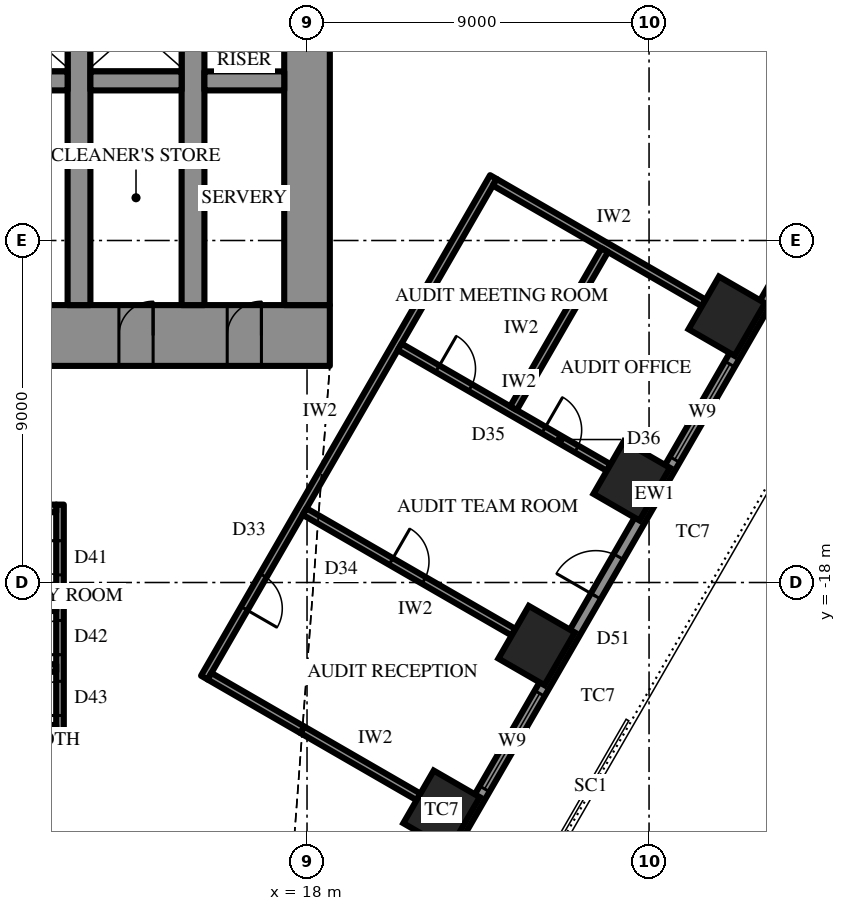
"""IFC4 building model, lengths in metres.
Left out: names, types, materials, properties, quantities, classifications, styles, units other than length and angle.
Written with IfcOpenShell. Run it as: python <this file> out.ifc"""

import sys

from ifc_helpers import new_model, si_unit, direction, frame, frame_2d, origin, origin_2d, place, context, subcontext, project, spatial, rectangle, extrude, element, fill, save


model = new_model("IFC4")
c1 = context("Model", 3, precision=1e-05, world=origin(), true_north=direction((0.0, 1.0)))
c2 = subcontext(c1, "Body", "Model", "MODEL_VIEW")
j1 = project(units=[si_unit("LENGTHUNIT", "METRE"), si_unit("PLANEANGLEUNIT", "RADIAN")], contexts=[c1])
p1 = place(None, origin())
s1 = spatial("IfcSite", under=j1, at=p1, CompositionType="ELEMENT")
p2 = place(p1, origin())
s2 = spatial("IfcBuilding", under=s1, at=p2, CompositionType="ELEMENT")
p3 = place(p2, frame((0.0, 0.0, 161.5)))
s3 = spatial("IfcBuildingStorey", under=s2, at=p3, CompositionType="ELEMENT", Elevation=161.5)
for number, where, z_axis, x_axis in (
    (1, (21.54, -23.992, 0.0), (0.0, 0.0, 1.0), (0.5, 0.866, 0.0)),
    (2, (24.042, -19.658, 0.0), (0.0, 0.0, 1.0), (0.5, 0.866, 0.0)),
    (3, (26.544, -15.325, 0.0), (0.0, 0.0, 1.0), (0.5, 0.866, 0.0)),
    (4, (29.045, -10.992, 0.0), (0.0, 0.0, 1.0), (0.5, 0.866, 0.0)),
):
    element("IfcColumn", number, at=place(p3, frame(where, z_axis=z_axis, x_axis=x_axis)), inside=s3, PredefinedType="COLUMN", context=c2, shape_type="SweptSolid", body=[
        extrude(rectangle(XDim=1.6, YDim=1.4, at=origin_2d()), origin(), (0.0, 0.0, 1.0), 4.2),
    ])
p4 = place(p3, frame((18.6, -11.5, 0.0), z_axis=(0.0, 0.0, 1.0), x_axis=(-1.0, 0.0, 0.0)))
e5 = element("IfcWall", 5, at=p4, inside=s3, PredefinedType="SHEAR", context=c2, shape_type="SweptSolid", body=[
    extrude(rectangle(XDim=37.2, YDim=1.6, at=frame_2d((18.6, 0.0))), origin(), (0.0, 0.0, 1.0), 4.2),
])
p5 = place(p4, frame((19.45, 0.0, 0.0)))
e6 = element("IfcOpeningElement", 6, at=p5, cuts=e5, PredefinedType="OPENING", context=c2, shape_type="SweptSolid", body=[
    extrude(rectangle(XDim=0.9, YDim=2.2, at=frame_2d((0.45, 1.1))), frame((0.0, 0.81, 0.0), z_axis=(0.0, -1.0, 0.0), x_axis=(1.0, 0.0, 0.0)), (0.0, 0.0, 1.0), 1.62),
])
p6 = place(p4, frame((22.45, 0.0, 0.0)))
e7 = element("IfcOpeningElement", 7, at=p6, cuts=e5, PredefinedType="OPENING", context=c2, shape_type="SweptSolid", body=[
    extrude(rectangle(XDim=0.9, YDim=2.2, at=frame_2d((0.45, 1.1))), frame((0.0, 0.81, 0.0), z_axis=(0.0, -1.0, 0.0), x_axis=(1.0, 0.0, 0.0)), (0.0, 0.0, 1.0), 1.62),
])
p7 = place(p4, frame((25.5, 0.0, 0.0)))
e8 = element("IfcOpeningElement", 8, at=p7, cuts=e5, PredefinedType="OPENING", context=c2, shape_type="SweptSolid", body=[
    extrude(rectangle(XDim=1.0, YDim=2.2, at=frame_2d((0.5, 1.1))), frame((0.0, 0.81, 0.0), z_axis=(0.0, -1.0, 0.0), x_axis=(1.0, 0.0, 0.0)), (0.0, 0.0, 1.0), 1.62),
])
p8 = place(p4, frame((1.8, 0.0, 0.0)))
e9 = element("IfcOpeningElement", 9, at=p8, cuts=e5, PredefinedType="OPENING", context=c2, shape_type="SweptSolid", body=[
    extrude(rectangle(XDim=0.9, YDim=2.2, at=frame_2d((0.45, 1.1))), frame((0.0, 0.81, 0.0), z_axis=(0.0, -1.0, 0.0), x_axis=(1.0, 0.0, 0.0)), (0.0, 0.0, 1.0), 1.62),
])
p9 = place(p4, frame((4.65, 0.0, 0.0)))
e10 = element("IfcOpeningElement", 10, at=p9, cuts=e5, PredefinedType="OPENING", context=c2, shape_type="SweptSolid", body=[
    extrude(rectangle(XDim=0.9, YDim=2.2, at=frame_2d((0.45, 1.1))), frame((0.0, 0.81, 0.0), z_axis=(0.0, -1.0, 0.0), x_axis=(1.0, 0.0, 0.0)), (0.0, 0.0, 1.0), 1.62),
])
p10 = place(p4, frame((7.75, 0.0, 0.0)))
e11 = element("IfcOpeningElement", 11, at=p10, cuts=e5, PredefinedType="OPENING", context=c2, shape_type="SweptSolid", body=[
    extrude(rectangle(XDim=0.9, YDim=2.2, at=frame_2d((0.45, 1.1))), frame((0.0, 0.81, 0.0), z_axis=(0.0, -1.0, 0.0), x_axis=(1.0, 0.0, 0.0)), (0.0, 0.0, 1.0), 1.62),
])
p11 = place(p4, frame((28.55, 0.0, 0.0)))
e12 = element("IfcOpeningElement", 12, at=p11, cuts=e5, PredefinedType="OPENING", context=c2, shape_type="SweptSolid", body=[
    extrude(rectangle(XDim=0.9, YDim=2.2, at=frame_2d((0.45, 1.1))), frame((0.0, 0.81, 0.0), z_axis=(0.0, -1.0, 0.0), x_axis=(1.0, 0.0, 0.0)), (0.0, 0.0, 1.0), 1.62),
])
p12 = place(p4, frame((31.65, 0.0, 0.0)))
e13 = element("IfcOpeningElement", 13, at=p12, cuts=e5, PredefinedType="OPENING", context=c2, shape_type="SweptSolid", body=[
    extrude(rectangle(XDim=0.9, YDim=2.2, at=frame_2d((0.45, 1.1))), frame((0.0, 0.81, 0.0), z_axis=(0.0, -1.0, 0.0), x_axis=(1.0, 0.0, 0.0)), (0.0, 0.0, 1.0), 1.62),
])
p13 = place(p4, frame((34.5, 0.0, 0.0)))
e14 = element("IfcOpeningElement", 14, at=p13, cuts=e5, PredefinedType="OPENING", context=c2, shape_type="SweptSolid", body=[
    extrude(rectangle(XDim=0.9, YDim=2.2, at=frame_2d((0.45, 1.1))), frame((0.0, 0.81, 0.0), z_axis=(0.0, -1.0, 0.0), x_axis=(1.0, 0.0, 0.0)), (0.0, 0.0, 1.0), 1.62),
])
p14 = place(p3, frame((18.0, -10.7, 0.0), z_axis=(0.0, 0.0, 1.0), x_axis=(0.0, 1.0, 0.0)))
e15 = element("IfcWall", 15, at=p14, inside=s3, PredefinedType="SHEAR", context=c2, shape_type="SweptSolid", body=[
    extrude(rectangle(XDim=21.4, YDim=1.2, at=frame_2d((10.7, 0.0))), origin(), (0.0, 0.0, 1.0), 4.2),
])
p15 = place(p14, frame((9.8, 0.0, 0.0)))
e16 = element("IfcOpeningElement", 16, at=p15, cuts=e15, PredefinedType="OPENING", context=c2, shape_type="SweptSolid", body=[
    extrude(rectangle(XDim=1.8, YDim=2.4, at=frame_2d((0.9, 1.2))), frame((0.0, 0.61, 0.0), z_axis=(0.0, -1.0, 0.0), x_axis=(1.0, 0.0, 0.0)), (0.0, 0.0, 1.0), 1.22),
])
p16 = place(p3, frame((12.0, -10.7, 0.0), z_axis=(0.0, 0.0, 1.0), x_axis=(0.0, 1.0, 0.0)))
e17 = element("IfcWall", 17, at=p16, inside=s3, PredefinedType="SHEAR", context=c2, shape_type="SweptSolid", body=[
    extrude(rectangle(XDim=21.4, YDim=0.6, at=frame_2d((10.7, 0.0))), origin(), (0.0, 0.0, 1.0), 4.2),
])
p17 = place(p16, frame((9.8, 0.0, 0.0)))
e18 = element("IfcOpeningElement", 18, at=p17, cuts=e17, PredefinedType="OPENING", context=c2, shape_type="SweptSolid", body=[
    extrude(rectangle(XDim=1.8, YDim=2.4, at=frame_2d((0.9, 1.2))), frame((0.0, 0.31, 0.0), z_axis=(0.0, -1.0, 0.0), x_axis=(1.0, 0.0, 0.0)), (0.0, 0.0, 1.0), 0.62),
])
p18 = place(p3, frame((15.0, -10.7, 0.0), z_axis=(0.0, 0.0, 1.0), x_axis=(0.0, 1.0, 0.0)))
e19 = element("IfcWall", 19, at=p18, inside=s3, PredefinedType="SHEAR", context=c2, shape_type="SweptSolid", body=[
    extrude(rectangle(XDim=21.4, YDim=0.6, at=frame_2d((10.7, 0.0))), origin(), (0.0, 0.0, 1.0), 4.2),
])
p19 = place(p18, frame((9.8, 0.0, 0.0)))
e20 = element("IfcOpeningElement", 20, at=p19, cuts=e19, PredefinedType="OPENING", context=c2, shape_type="SweptSolid", body=[
    extrude(rectangle(XDim=1.8, YDim=2.4, at=frame_2d((0.9, 1.2))), frame((0.0, 0.31, 0.0), z_axis=(0.0, -1.0, 0.0), x_axis=(1.0, 0.0, 0.0)), (0.0, 0.0, 1.0), 0.62),
])
p20 = place(p3, frame((17.4, -4.8, 0.0), z_axis=(0.0, 0.0, 1.0), x_axis=(-1.0, 0.0, 0.0)))
e21 = element("IfcWall", 21, at=p20, inside=s3, PredefinedType="SHEAR", context=c2, shape_type="SweptSolid", body=[
    extrude(rectangle(XDim=2.1, YDim=0.5, at=frame_2d((1.05, 0.0))), origin(), (0.0, 0.0, 1.0), 4.2),
])
p21 = place(p3, frame((14.7, -4.8, 0.0), z_axis=(0.0, 0.0, 1.0), x_axis=(-1.0, 0.0, 0.0)))
e22 = element("IfcWall", 22, at=p21, inside=s3, PredefinedType="SHEAR", context=c2, shape_type="SweptSolid", body=[
    extrude(rectangle(XDim=2.4, YDim=0.5, at=frame_2d((1.2, 0.0))), origin(), (0.0, 0.0, 1.0), 4.2),
])
p22 = place(p3, frame((11.7, -4.8, 0.0), z_axis=(0.0, 0.0, 1.0), x_axis=(-1.0, 0.0, 0.0)))
e23 = element("IfcWall", 23, at=p22, inside=s3, PredefinedType="SHEAR", context=c2, shape_type="SweptSolid", body=[
    extrude(rectangle(XDim=23.4, YDim=0.5, at=frame_2d((11.7, 0.0))), origin(), (0.0, 0.0, 1.0), 4.2),
])
p23 = place(p22, frame((6.6, 0.0, 0.0)))
e24 = element("IfcOpeningElement", 24, at=p23, cuts=e23, PredefinedType="OPENING", context=c2, shape_type="SweptSolid", body=[
    extrude(rectangle(XDim=1.2, YDim=2.2, at=frame_2d((0.6, 1.1))), frame((0.0, 0.26, 0.0), z_axis=(0.0, -1.0, 0.0), x_axis=(1.0, 0.0, 0.0)), (0.0, 0.0, 1.0), 0.52),
])
p24 = place(p22, frame((3.6, 0.0, 0.0)))
e25 = element("IfcOpeningElement", 25, at=p24, cuts=e23, PredefinedType="OPENING", context=c2, shape_type="SweptSolid", body=[
    extrude(rectangle(XDim=1.2, YDim=2.2, at=frame_2d((0.6, 1.1))), frame((0.0, 0.26, 0.0), z_axis=(0.0, -1.0, 0.0), x_axis=(1.0, 0.0, 0.0)), (0.0, 0.0, 1.0), 0.52),
])
p25 = place(p3, frame((19.644, -28.675, 0.0), z_axis=(0.0, 0.0, 1.0), x_axis=(0.500003084452, 0.866023622968, 0.0)))
e26 = element("IfcWall", 26, at=p25, inside=s3, PredefinedType="SOLIDWALL", context=c2, shape_type="SweptSolid", body=[
    extrude(rectangle(XDim=30.022, YDim=0.3, at=frame_2d((15.011, 0.0))), origin(), (0.0, 0.0, 1.0), 2.75),
])
p26 = place(p25, frame((1.052, 0.0, 0.6)))
e27 = element("IfcOpeningElement", 27, at=p26, cuts=e26, PredefinedType="OPENING", context=c2, shape_type="SweptSolid", body=[
    extrude(rectangle(XDim=2.9, YDim=1.9, at=frame_2d((1.45, 0.95))), frame((0.0, 0.16, 0.0), z_axis=(0.0, -1.0, 0.0), x_axis=(1.0, 0.0, 0.0)), (0.0, 0.0, 1.0), 0.32),
])
p27 = place(p25, frame((6.056, 0.0, 0.6)))
e28 = element("IfcOpeningElement", 28, at=p27, cuts=e26, PredefinedType="OPENING", context=c2, shape_type="SweptSolid", body=[
    extrude(rectangle(XDim=2.9, YDim=1.9, at=frame_2d((1.45, 0.95))), frame((0.0, 0.16, 0.0), z_axis=(0.0, -1.0, 0.0), x_axis=(1.0, 0.0, 0.0)), (0.0, 0.0, 1.0), 0.32),
])
p28 = place(p25, frame((11.909, 0.0, 0.0)))
e29 = element("IfcOpeningElement", 29, at=p28, cuts=e26, PredefinedType="OPENING", context=c2, shape_type="SweptSolid", body=[
    extrude(rectangle(XDim=1.2, YDim=2.4, at=frame_2d((0.6, 1.2))), frame((0.0, 0.16, 0.0), z_axis=(0.0, -1.0, 0.0), x_axis=(1.0, 0.0, 0.0)), (0.0, 0.0, 1.0), 0.32),
])
p29 = place(p25, frame((16.063, 0.0, 0.6)))
e30 = element("IfcOpeningElement", 30, at=p29, cuts=e26, PredefinedType="OPENING", context=c2, shape_type="SweptSolid", body=[
    extrude(rectangle(XDim=2.9, YDim=1.9, at=frame_2d((1.45, 0.95))), frame((0.0, 0.16, 0.0), z_axis=(0.0, -1.0, 0.0), x_axis=(1.0, 0.0, 0.0)), (0.0, 0.0, 1.0), 0.32),
])
p30 = place(p25, frame((21.067, 0.0, 0.6)))
e31 = element("IfcOpeningElement", 31, at=p30, cuts=e26, PredefinedType="OPENING", context=c2, shape_type="SweptSolid", body=[
    extrude(rectangle(XDim=2.9, YDim=1.9, at=frame_2d((1.45, 0.95))), frame((0.0, 0.16, 0.0), z_axis=(0.0, -1.0, 0.0), x_axis=(1.0, 0.0, 0.0)), (0.0, 0.0, 1.0), 0.32),
])
p31 = place(p25, frame((26.07, 0.0, 0.6)))
e32 = element("IfcOpeningElement", 32, at=p31, cuts=e26, PredefinedType="OPENING", context=c2, shape_type="SweptSolid", body=[
    extrude(rectangle(XDim=2.9, YDim=1.9, at=frame_2d((1.45, 0.95))), frame((0.0, 0.16, 0.0), z_axis=(0.0, -1.0, 0.0), x_axis=(1.0, 0.0, 0.0)), (0.0, 0.0, 1.0), 0.32),
])
p32 = place(p3, frame((15.298, -20.503, 0.0), z_axis=(0.0, 0.0, 1.0), x_axis=(0.500010972563, 0.86601906868, 0.0)))
e33 = element("IfcWall", 33, at=p32, inside=s3, PredefinedType="PARTITIONING", context=c2, shape_type="SweptSolid", body=[
    extrude(rectangle(XDim=15.211, YDim=0.2, at=frame_2d((7.605, 0.0))), origin(), (0.0, 0.0, 1.0), 4.0),
])
p33 = place(p32, frame((2.102, 0.0, 0.0)))
e34 = element("IfcOpeningElement", 34, at=p33, cuts=e33, PredefinedType="OPENING", context=c2, shape_type="SweptSolid", body=[
    extrude(rectangle(XDim=1.0, YDim=2.2, at=frame_2d((0.5, 1.1))), frame((0.0, 0.11, 0.0), z_axis=(0.0, -1.0, 0.0), x_axis=(1.0, 0.0, 0.0)), (0.0, 0.0, 1.0), 0.22),
])
p34 = place(p3, frame((15.435, -20.467, 0.0), z_axis=(0.0, 0.0, 1.0), x_axis=(0.866008320966, -0.500029587143, 0.0)))
e35 = element("IfcWall", 35, at=p34, inside=s3, PredefinedType="PARTITIONING", context=c2, shape_type="SweptSolid", body=[
    extrude(rectangle(XDim=2.821, YDim=0.2, at=frame_2d((1.411, 0.0))), origin(), (0.0, 0.0, 1.0), 4.0),
])
p35 = place(p3, frame((17.878, -21.877, 0.0), z_axis=(0.0, 0.0, 1.0), x_axis=(0.866033512162, -0.499985955615, 0.0)))
e36 = element("IfcWall", 36, at=p35, inside=s3, PredefinedType="PARTITIONING", context=c2, shape_type="SweptSolid", body=[
    extrude(rectangle(XDim=3.529, YDim=0.2, at=frame_2d((1.764, 0.0))), origin(), (0.0, 0.0, 1.0), 3.082),
])
p36 = place(p3, frame((17.936, -16.133, 0.0), z_axis=(0.0, 0.0, 1.0), x_axis=(0.866022320763, -0.500005339912, 0.0)))
e37 = element("IfcWall", 37, at=p36, inside=s3, PredefinedType="PARTITIONING", context=c2, shape_type="SweptSolid", body=[
    extrude(rectangle(XDim=6.35, YDim=0.2, at=frame_2d((3.175, 0.0))), origin(), (0.0, 0.0, 1.0), 3.082),
])
p37 = place(p36, frame((2.625, 0.0, 0.0)))
e38 = element("IfcOpeningElement", 38, at=p37, cuts=e37, PredefinedType="OPENING", context=c2, shape_type="SweptSolid", body=[
    extrude(rectangle(XDim=1.0, YDim=2.2, at=frame_2d((0.5, 1.1))), frame((0.0, 0.11, 0.0), z_axis=(0.0, -1.0, 0.0), x_axis=(1.0, 0.0, 0.0)), (0.0, 0.0, 1.0), 0.22),
])
p38 = place(p3, frame((20.438, -11.8, 0.0), z_axis=(0.0, 0.0, 1.0), x_axis=(0.866022320763, -0.500005339912, 0.0)))
e39 = element("IfcWall", 39, at=p38, inside=s3, PredefinedType="PARTITIONING", context=c2, shape_type="SweptSolid", body=[
    extrude(rectangle(XDim=6.35, YDim=0.2, at=frame_2d((3.175, 0.0))), origin(), (0.0, 0.0, 1.0), 4.0),
])
p39 = place(p38, frame((1.15, 0.0, 0.0)))
e40 = element("IfcOpeningElement", 40, at=p39, cuts=e39, PredefinedType="OPENING", context=c2, shape_type="SweptSolid", body=[
    extrude(rectangle(XDim=1.0, YDim=2.2, at=frame_2d((0.5, 1.1))), frame((0.0, 0.11, 0.0), z_axis=(0.0, -1.0, 0.0), x_axis=(1.0, 0.0, 0.0)), (0.0, 0.0, 1.0), 0.22),
])
p40 = place(p38, frame((4.375, 0.0, 0.0)))
e41 = element("IfcOpeningElement", 41, at=p40, cuts=e39, PredefinedType="OPENING", context=c2, shape_type="SweptSolid", body=[
    extrude(rectangle(XDim=1.0, YDim=2.2, at=frame_2d((0.5, 1.1))), frame((0.0, 0.11, 0.0), z_axis=(0.0, -1.0, 0.0), x_axis=(1.0, 0.0, 0.0)), (0.0, 0.0, 1.0), 0.22),
])
p41 = place(p3, frame((22.94, -7.467, 0.0), z_axis=(0.0, 0.0, 1.0), x_axis=(0.866022320763, -0.500005339912, 0.0)))
e42 = element("IfcWall", 42, at=p41, inside=s3, PredefinedType="PARTITIONING", context=c2, shape_type="SweptSolid", body=[
    extrude(rectangle(XDim=6.35, YDim=0.2, at=frame_2d((3.175, 0.0))), origin(), (0.0, 0.0, 1.0), 3.082),
])
p42 = place(p3, frame((23.433, -13.413, 0.0), z_axis=(0.0, 0.0, 1.0), x_axis=(0.499998147991, 0.86602647304, 0.0)))
e43 = element("IfcWall", 43, at=p42, inside=s3, PredefinedType="PARTITIONING", context=c2, shape_type="SweptSolid", body=[
    extrude(rectangle(XDim=4.804, YDim=0.2, at=frame_2d((2.402, 0.0))), origin(), (0.0, 0.0, 1.0), 4.0),
])
p43 = place(p3, frame((11.5, -15.95, 0.0), z_axis=(0.0, 0.0, 1.0), x_axis=(0.0, -1.0, 0.0)))
e44 = element("IfcWall", 44, at=p43, inside=s3, PredefinedType="PARTITIONING", context=c2, shape_type="SweptSolid", body=[
    extrude(rectangle(XDim=6.0, YDim=0.2, at=frame_2d((3.0, 0.0))), origin(), (0.0, 0.0, 1.0), 4.0),
])
p44 = place(p43, frame((0.95, 0.0, 0.0)))
e45 = element("IfcOpeningElement", 45, at=p44, cuts=e44, PredefinedType="OPENING", context=c2, shape_type="SweptSolid", body=[
    extrude(rectangle(XDim=0.9, YDim=2.2, at=frame_2d((0.45, 1.1))), frame((0.0, 0.11, 0.0), z_axis=(0.0, -1.0, 0.0), x_axis=(1.0, 0.0, 0.0)), (0.0, 0.0, 1.0), 0.22),
])
p45 = place(p43, frame((3.05, 0.0, 0.0)))
e46 = element("IfcOpeningElement", 46, at=p45, cuts=e44, PredefinedType="OPENING", context=c2, shape_type="SweptSolid", body=[
    extrude(rectangle(XDim=0.9, YDim=2.2, at=frame_2d((0.45, 1.1))), frame((0.0, 0.11, 0.0), z_axis=(0.0, -1.0, 0.0), x_axis=(1.0, 0.0, 0.0)), (0.0, 0.0, 1.0), 0.22),
])
p46 = place(p43, frame((4.65, 0.0, 0.0)))
e47 = element("IfcOpeningElement", 47, at=p46, cuts=e44, PredefinedType="OPENING", context=c2, shape_type="SweptSolid", body=[
    extrude(rectangle(XDim=0.9, YDim=2.2, at=frame_2d((0.45, 1.1))), frame((0.0, 0.11, 0.0), z_axis=(0.0, -1.0, 0.0), x_axis=(1.0, 0.0, 0.0)), (0.0, 0.0, 1.0), 0.22),
])
for number, where, z_axis, x_axis in (
    (48, (9.1, -16.05, 0.0), (0.0, 0.0, 1.0), (1.0, 0.0, 0.0)),
    (49, (9.1, -18.65, 0.0), (0.0, 0.0, 1.0), (1.0, 0.0, 0.0)),
    (50, (9.1, -20.25, 0.0), (0.0, 0.0, 1.0), (1.0, 0.0, 0.0)),
    (51, (9.1, -21.85, 0.0), (0.0, 0.0, 1.0), (1.0, 0.0, 0.0)),
):
    element("IfcWall", number, at=place(p3, frame(where, z_axis=z_axis, x_axis=x_axis)), inside=s3, PredefinedType="PARTITIONING", context=c2, shape_type="SweptSolid", body=[
        extrude(rectangle(XDim=2.3, YDim=0.2, at=frame_2d((1.15, 0.0))), origin(), (0.0, 0.0, 1.0), 4.0),
    ])
p47 = place(p27, origin())
e52 = element("IfcWindow", 52, at=p47, inside=s3, PartitioningType="SINGLE_PANEL", PredefinedType="WINDOW", context=c2, shape_type="SweptSolid", body=[
    extrude(rectangle(XDim=2.9, YDim=1.9, at=frame_2d((1.45, 0.95))), frame((0.0, 0.03, 0.0), z_axis=(0.0, -1.0, 0.0), x_axis=(1.0, 0.0, 0.0)), (0.0, 0.0, 1.0), 0.06),
])
fill(e28, e52)
p48 = place(p28, origin())
e53 = element("IfcDoor", 53, at=p48, inside=s3, OperationType="SINGLE_SWING_RIGHT", PredefinedType="DOOR", context=c2, shape_type="SweptSolid", body=[
    extrude(rectangle(XDim=1.2, YDim=2.4, at=frame_2d((0.6, 1.2))), frame((0.0, 0.025, 0.0), z_axis=(0.0, -1.0, 0.0), x_axis=(1.0, 0.0, 0.0)), (0.0, 0.0, 1.0), 0.05),
])
fill(e29, e53)
p49 = place(p29, origin())
e54 = element("IfcWindow", 54, at=p49, inside=s3, PartitioningType="SINGLE_PANEL", PredefinedType="WINDOW", context=c2, shape_type="SweptSolid", body=[
    extrude(rectangle(XDim=2.9, YDim=1.9, at=frame_2d((1.45, 0.95))), frame((0.0, 0.03, 0.0), z_axis=(0.0, -1.0, 0.0), x_axis=(1.0, 0.0, 0.0)), (0.0, 0.0, 1.0), 0.06),
])
fill(e30, e54)
p50 = place(p8, frame((0.9, 0.0, 0.0), z_axis=(0.0, 0.0, 1.0), x_axis=(-1.0, 0.0, 0.0)))
e55 = element("IfcDoor", 55, at=p50, inside=s3, OperationType="SINGLE_SWING_LEFT", PredefinedType="DOOR", context=c2, shape_type="SweptSolid", body=[
    extrude(rectangle(XDim=0.9, YDim=2.2, at=frame_2d((0.45, 1.1))), frame((0.0, 0.025, 0.0), z_axis=(0.0, -1.0, 0.0), x_axis=(1.0, 0.0, 0.0)), (0.0, 0.0, 1.0), 0.05),
])
fill(e9, e55)
p51 = place(p9, frame((0.9, 0.0, 0.0), z_axis=(0.0, 0.0, 1.0), x_axis=(-1.0, 0.0, 0.0)))
e56 = element("IfcDoor", 56, at=p51, inside=s3, OperationType="SINGLE_SWING_LEFT", PredefinedType="DOOR", context=c2, shape_type="SweptSolid", body=[
    extrude(rectangle(XDim=0.9, YDim=2.2, at=frame_2d((0.45, 1.1))), frame((0.0, 0.025, 0.0), z_axis=(0.0, -1.0, 0.0), x_axis=(1.0, 0.0, 0.0)), (0.0, 0.0, 1.0), 0.05),
])
fill(e10, e56)
p52 = place(p33, frame((1.0, 0.0, 0.0), z_axis=(0.0, 0.0, 1.0), x_axis=(-1.0, 0.0, 0.0)))
e57 = element("IfcDoor", 57, at=p52, inside=s3, OperationType="SINGLE_SWING_LEFT", PredefinedType="DOOR", context=c2, shape_type="SweptSolid", body=[
    extrude(rectangle(XDim=1.0, YDim=2.2, at=frame_2d((0.5, 1.1))), frame((0.0, 0.025, 0.0), z_axis=(0.0, -1.0, 0.0), x_axis=(1.0, 0.0, 0.0)), (0.0, 0.0, 1.0), 0.05),
])
fill(e34, e57)
p53 = place(p37, origin())
e58 = element("IfcDoor", 58, at=p53, inside=s3, OperationType="SINGLE_SWING_RIGHT", PredefinedType="DOOR", context=c2, shape_type="SweptSolid", body=[
    extrude(rectangle(XDim=1.0, YDim=2.2, at=frame_2d((0.5, 1.1))), frame((0.0, 0.025, 0.0), z_axis=(0.0, -1.0, 0.0), x_axis=(1.0, 0.0, 0.0)), (0.0, 0.0, 1.0), 0.05),
])
fill(e38, e58)
p54 = place(p39, origin())
e59 = element("IfcDoor", 59, at=p54, inside=s3, OperationType="SINGLE_SWING_RIGHT", PredefinedType="DOOR", context=c2, shape_type="SweptSolid", body=[
    extrude(rectangle(XDim=1.0, YDim=2.2, at=frame_2d((0.5, 1.1))), frame((0.0, 0.025, 0.0), z_axis=(0.0, -1.0, 0.0), x_axis=(1.0, 0.0, 0.0)), (0.0, 0.0, 1.0), 0.05),
])
fill(e40, e59)
p55 = place(p40, origin())
e60 = element("IfcDoor", 60, at=p55, inside=s3, OperationType="SINGLE_SWING_RIGHT", PredefinedType="DOOR", context=c2, shape_type="SweptSolid", body=[
    extrude(rectangle(XDim=1.0, YDim=2.2, at=frame_2d((0.5, 1.1))), frame((0.0, 0.025, 0.0), z_axis=(0.0, -1.0, 0.0), x_axis=(1.0, 0.0, 0.0)), (0.0, 0.0, 1.0), 0.05),
])
fill(e41, e60)
p56 = place(p44, frame((0.9, 0.0, 0.0), z_axis=(0.0, 0.0, 1.0), x_axis=(-1.0, 0.0, 0.0)))
e61 = element("IfcDoor", 61, at=p56, inside=s3, OperationType="SINGLE_SWING_LEFT", PredefinedType="DOOR", context=c2, shape_type="SweptSolid", body=[
    extrude(rectangle(XDim=0.9, YDim=2.2, at=frame_2d((0.45, 1.1))), frame((0.0, 0.025, 0.0), z_axis=(0.0, -1.0, 0.0), x_axis=(1.0, 0.0, 0.0)), (0.0, 0.0, 1.0), 0.05),
])
fill(e45, e61)
p57 = place(p45, frame((0.9, 0.0, 0.0), z_axis=(0.0, 0.0, 1.0), x_axis=(-1.0, 0.0, 0.0)))
e62 = element("IfcDoor", 62, at=p57, inside=s3, OperationType="SINGLE_SWING_RIGHT", PredefinedType="DOOR", context=c2, shape_type="SweptSolid", body=[
    extrude(rectangle(XDim=0.9, YDim=2.2, at=frame_2d((0.45, 1.1))), frame((0.0, 0.025, 0.0), z_axis=(0.0, -1.0, 0.0), x_axis=(1.0, 0.0, 0.0)), (0.0, 0.0, 1.0), 0.05),
])
fill(e46, e62)
p58 = place(p46, frame((0.9, 0.0, 0.0), z_axis=(0.0, 0.0, 1.0), x_axis=(-1.0, 0.0, 0.0)))
e63 = element("IfcDoor", 63, at=p58, inside=s3, OperationType="SINGLE_SWING_RIGHT", PredefinedType="DOOR", context=c2, shape_type="SweptSolid", body=[
    extrude(rectangle(XDim=0.9, YDim=2.2, at=frame_2d((0.45, 1.1))), frame((0.0, 0.025, 0.0), z_axis=(0.0, -1.0, 0.0), x_axis=(1.0, 0.0, 0.0)), (0.0, 0.0, 1.0), 0.05),
])
fill(e47, e63)
save(model, sys.argv[1])
